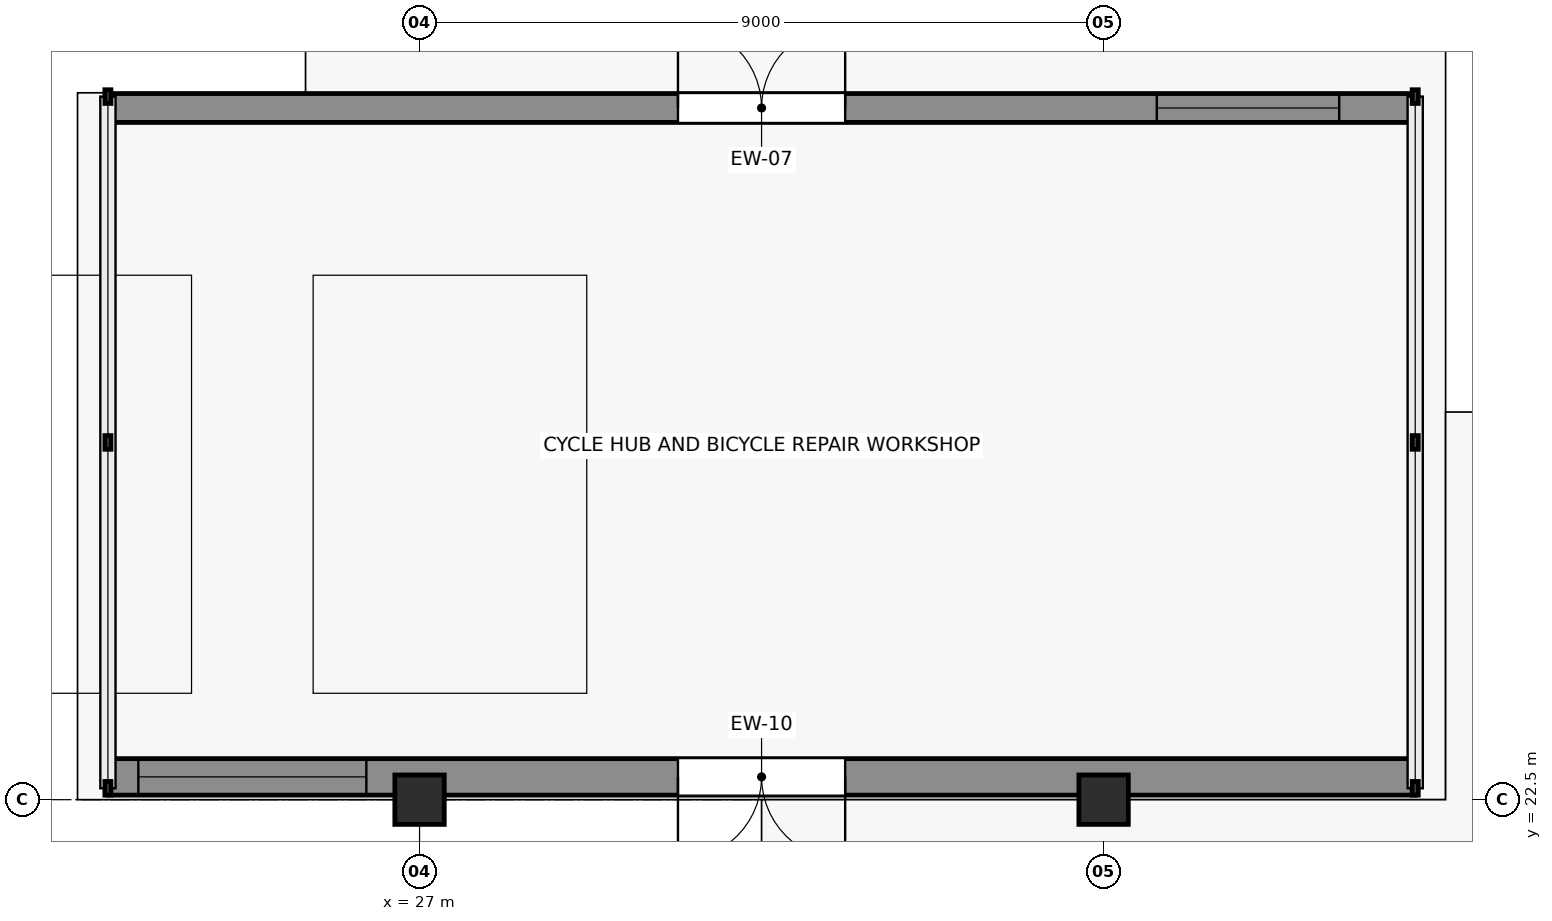
"""IFC4 building model, lengths in metres.
Left out: names, types, materials, properties, quantities, classifications, styles, units other than length and angle.
Written with IfcOpenShell. Run it as: python <this file> out.ifc"""

import sys

from ifc_helpers import new_model, si_unit, direction, frame, frame_2d, origin, origin_2d, place, context, subcontext, project, spatial, rectangle, extrude, element, fill, save


model = new_model("IFC4")
c1 = context("Model", 3, precision=1e-05, world=origin(), true_north=direction((0.0, 1.0)))
c2 = subcontext(c1, "Body", "Model", "MODEL_VIEW")
j1 = project(units=[si_unit("LENGTHUNIT", "METRE"), si_unit("PLANEANGLEUNIT", "RADIAN")], contexts=[c1])
p1 = place(None, origin())
s1 = spatial("IfcSite", under=j1, at=p1, CompositionType="ELEMENT")
p2 = place(p1, origin())
s2 = spatial("IfcBuilding", under=s1, at=p2, CompositionType="ELEMENT")
p3 = place(p2, origin())
s3 = spatial("IfcBuildingStorey", under=s2, at=p3, CompositionType="ELEMENT", Elevation=0.0)
for number, where, z_axis, x_axis in (
    (1, (27.0, 22.5, 0.0), (0.0, 0.0, 1.0), (1.0, 0.0, 0.0)),
    (2, (36.0, 22.5, 0.0), (0.0, 0.0, 1.0), (1.0, 0.0, 0.0)),
):
    element("IfcColumn", number, at=place(p3, frame(where, z_axis=z_axis, x_axis=x_axis)), inside=s3, PredefinedType="COLUMN", context=c2, shape_type="SweptSolid", body=[
        extrude(rectangle(XDim=0.65, YDim=0.65, at=origin_2d()), origin(), (0.0, 0.0, 1.0), 6.64),
    ])
p4 = place(p3, frame((40.1, 22.8, 0.0), z_axis=(0.0, 0.0, 1.0), x_axis=(-1.0, 0.0, 0.0)))
e3 = element("IfcWall", 3, at=p4, inside=s3, PredefinedType="SOLIDWALL", context=c2, shape_type="SweptSolid", body=[
    extrude(rectangle(XDim=17.2, YDim=0.48, at=frame_2d((8.6, 0.0))), origin(), (0.0, 0.0, 1.0), 4.2),
])
p5 = place(p4, frame((7.5, 0.0, 0.0)))
e4 = element("IfcOpeningElement", 4, at=p5, cuts=e3, PredefinedType="OPENING", context=c2, shape_type="SweptSolid", body=[
    extrude(rectangle(XDim=2.2, YDim=2.4, at=frame_2d((1.1, 1.2))), frame((0.0, 0.25, 0.0), z_axis=(0.0, -1.0, 0.0), x_axis=(1.0, 0.0, 0.0)), (0.0, 0.0, 1.0), 0.5),
])
p6 = place(p4, frame((13.8, 0.0, 1.05)))
e5 = element("IfcOpeningElement", 5, at=p6, cuts=e3, PredefinedType="OPENING", context=c2, shape_type="SweptSolid", body=[
    extrude(rectangle(XDim=3.0, YDim=1.6, at=frame_2d((1.5, 0.8))), frame((0.0, 0.25, 0.0), z_axis=(0.0, -1.0, 0.0), x_axis=(1.0, 0.0, 0.0)), (0.0, 0.0, 1.0), 0.5),
])
p7 = place(p3, frame((22.9, 31.6, 0.0), z_axis=(0.0, 0.0, 1.0), x_axis=(1.0, 0.0, 0.0)))
e6 = element("IfcWall", 6, at=p7, inside=s3, PredefinedType="SOLIDWALL", context=c2, shape_type="SweptSolid", body=[
    extrude(rectangle(XDim=17.2, YDim=0.38, at=frame_2d((8.6, 0.0))), origin(), (0.0, 0.0, 1.0), 4.2),
])
p8 = place(p7, frame((7.5, 0.0, 0.0)))
e7 = element("IfcOpeningElement", 7, at=p8, cuts=e6, PredefinedType="OPENING", context=c2, shape_type="SweptSolid", body=[
    extrude(rectangle(XDim=2.2, YDim=2.4, at=frame_2d((1.1, 1.2))), frame((0.0, 0.2, 0.0), z_axis=(0.0, -1.0, 0.0), x_axis=(1.0, 0.0, 0.0)), (0.0, 0.0, 1.0), 0.4),
])
p9 = place(p7, frame((13.8, 0.0, 1.05)))
e8 = element("IfcOpeningElement", 8, at=p9, cuts=e6, PredefinedType="OPENING", context=c2, shape_type="SweptSolid", body=[
    extrude(rectangle(XDim=2.4, YDim=1.6, at=frame_2d((1.2, 0.8))), frame((0.0, 0.2, 0.0), z_axis=(0.0, -1.0, 0.0), x_axis=(1.0, 0.0, 0.0)), (0.0, 0.0, 1.0), 0.4),
])
p10 = place(p5, origin())
e9 = element("IfcDoor", 9, at=p10, inside=s3, OperationType="DOUBLE_DOOR_SINGLE_SWING", PredefinedType="DOOR", context=c2, shape_type="SweptSolid", body=[
    extrude(rectangle(XDim=2.2, YDim=2.4, at=frame_2d((1.1, 1.2))), frame((0.0, 0.025, 0.0), z_axis=(0.0, -1.0, 0.0), x_axis=(1.0, 0.0, 0.0)), (0.0, 0.0, 1.0), 0.05),
])
fill(e4, e9)
p11 = place(p6, origin())
e10 = element("IfcWindow", 10, at=p11, inside=s3, PartitioningType="SINGLE_PANEL", PredefinedType="WINDOW", context=c2, shape_type="SweptSolid", body=[
    extrude(rectangle(XDim=3.0, YDim=1.6, at=frame_2d((1.5, 0.8))), frame((0.0, 0.03, 0.0), z_axis=(0.0, -1.0, 0.0), x_axis=(1.0, 0.0, 0.0)), (0.0, 0.0, 1.0), 0.06),
])
fill(e5, e10)
p12 = place(p8, origin())
e11 = element("IfcDoor", 11, at=p12, inside=s3, OperationType="DOUBLE_DOOR_SINGLE_SWING", PredefinedType="DOOR", context=c2, shape_type="SweptSolid", body=[
    extrude(rectangle(XDim=2.2, YDim=2.4, at=frame_2d((1.1, 1.2))), frame((0.0, 0.025, 0.0), z_axis=(0.0, -1.0, 0.0), x_axis=(1.0, 0.0, 0.0)), (0.0, 0.0, 1.0), 0.05),
])
fill(e7, e11)
p13 = place(p9, origin())
e12 = element("IfcWindow", 12, at=p13, inside=s3, PartitioningType="SINGLE_PANEL", PredefinedType="WINDOW", context=c2, shape_type="SweptSolid", body=[
    extrude(rectangle(XDim=2.4, YDim=1.6, at=frame_2d((1.2, 0.8))), frame((0.0, 0.03, 0.0), z_axis=(0.0, -1.0, 0.0), x_axis=(1.0, 0.0, 0.0)), (0.0, 0.0, 1.0), 0.06),
])
fill(e8, e12)
save(model, sys.argv[1])
